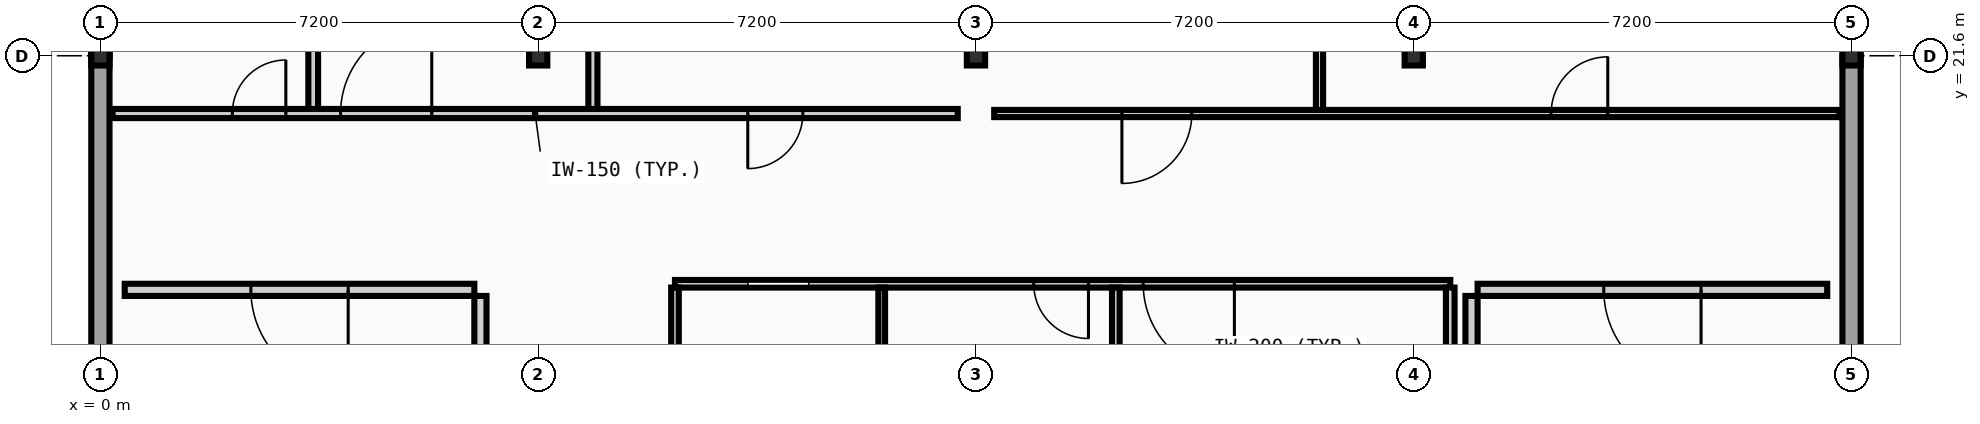
"""IFC4 building model, lengths in metres.
Left out: names, types, materials, properties, quantities, classifications, styles, units other than length and angle.
Written with IfcOpenShell. Run it as: python <this file> out.ifc"""

import sys

from ifc_helpers import new_model, si_unit, direction, frame, frame_2d, origin, origin_2d, place, context, subcontext, project, spatial, rectangle, i_section, extrude, element, fill, save


model = new_model("IFC4")
c1 = context("Model", 3, precision=1e-05, world=origin(), true_north=direction((0.0, 1.0)))
c2 = subcontext(c1, "Body", "Model", "MODEL_VIEW")
j1 = project(units=[si_unit("LENGTHUNIT", "METRE"), si_unit("PLANEANGLEUNIT", "RADIAN")], contexts=[c1])
p1 = place(None, origin())
s1 = spatial("IfcSite", under=j1, at=p1, CompositionType="ELEMENT")
p2 = place(p1, origin())
s2 = spatial("IfcBuilding", under=s1, at=p2, CompositionType="ELEMENT")
p3 = place(p2, frame((0.0, 0.0, 22.8)))
s3 = spatial("IfcBuildingStorey", under=s2, at=p3, CompositionType="ELEMENT", Elevation=22.8)
for number, where, z_axis, x_axis in (
    (1, (0.0, 21.6, 0.0), (0.0, 0.0, 1.0), (1.0, 0.0, 0.0)),
    (2, (7.2, 21.6, 0.0), (0.0, 0.0, 1.0), (1.0, 0.0, 0.0)),
    (3, (14.4, 21.6, 0.0), (0.0, 0.0, 1.0), (1.0, 0.0, 0.0)),
    (4, (21.6, 21.6, 0.0), (0.0, 0.0, 1.0), (1.0, 0.0, 0.0)),
    (5, (28.8, 21.6, 0.0), (0.0, 0.0, 1.0), (1.0, 0.0, 0.0)),
):
    element("IfcColumn", number, at=place(p3, frame(where, z_axis=z_axis, x_axis=x_axis)), inside=s3, PredefinedType="COLUMN", context=c2, shape_type="SweptSolid", body=[
        extrude(i_section(OverallWidth=0.3, OverallDepth=0.32, WebThickness=0.011, FlangeThickness=0.021, FilletRadius=0.027, at=origin_2d()), origin(), (0.0, 0.0, 1.0), 4.4),
    ])
p4 = place(p3, frame((0.0, 21.6, 0.0), z_axis=(0.0, 0.0, 1.0), x_axis=(0.0, -1.0, 0.0)))
e6 = element("IfcWall", 6, at=p4, inside=s3, PredefinedType="STANDARD", context=c2, shape_type="SweptSolid", body=[
    extrude(rectangle(XDim=7.15, YDim=0.3, at=frame_2d((3.575, 0.0))), origin(), (0.0, 0.0, 1.0), 4.215),
])
p5 = place(p3, frame((0.0, 28.8, 0.0), z_axis=(0.0, 0.0, 1.0), x_axis=(0.0, -1.0, 0.0)))
e7 = element("IfcWall", 7, at=p5, inside=s3, PredefinedType="STANDARD", context=c2, shape_type="SweptSolid", body=[
    extrude(rectangle(XDim=7.2, YDim=0.3, at=frame_2d((3.6, 0.0))), origin(), (0.0, 0.0, 1.0), 3.9),
])
p6 = place(p5, frame((1.56, 0.0, 0.9)))
e8 = element("IfcOpeningElement", 8, at=p6, cuts=e7, PredefinedType="OPENING", context=c2, shape_type="SweptSolid", body=[
    extrude(rectangle(XDim=1.2, YDim=1.8, at=frame_2d((0.6, 0.9))), frame((0.0, 0.16, 0.0), z_axis=(0.0, -1.0, 0.0), x_axis=(1.0, 0.0, 0.0)), (0.0, 0.0, 1.0), 0.32),
])
p7 = place(p5, frame((4.44, 0.0, 0.9)))
e9 = element("IfcOpeningElement", 9, at=p7, cuts=e7, PredefinedType="OPENING", context=c2, shape_type="SweptSolid", body=[
    extrude(rectangle(XDim=1.2, YDim=1.8, at=frame_2d((0.6, 0.9))), frame((0.0, 0.16, 0.0), z_axis=(0.0, -1.0, 0.0), x_axis=(1.0, 0.0, 0.0)), (0.0, 0.0, 1.0), 0.32),
])
p8 = place(p3, frame((28.8, 14.45, 0.0), z_axis=(0.0, 0.0, 1.0), x_axis=(0.0, 1.0, 0.0)))
e10 = element("IfcWall", 10, at=p8, inside=s3, PredefinedType="STANDARD", context=c2, shape_type="SweptSolid", body=[
    extrude(rectangle(XDim=7.15, YDim=0.3, at=frame_2d((3.575, 0.0))), origin(), (0.0, 0.0, 1.0), 4.215),
])
p9 = place(p3, frame((0.4, 17.75, 0.0), z_axis=(0.0, 0.0, 1.0), x_axis=(1.0, 0.0, 0.0)))
e11 = element("IfcWall", 11, at=p9, inside=s3, PredefinedType="PARTITIONING", context=c2, shape_type="SweptSolid", body=[
    extrude(rectangle(XDim=5.75, YDim=0.2, at=frame_2d((2.875, 0.0))), origin(), (0.0, 0.0, 1.0), 4.215),
])
p10 = place(p9, frame((2.075, 0.0, 0.0)))
e12 = element("IfcOpeningElement", 12, at=p10, cuts=e11, PredefinedType="OPENING", context=c2, shape_type="SweptSolid", body=[
    extrude(rectangle(XDim=1.6, YDim=2.2, at=frame_2d((0.8, 1.1))), frame((0.0, 0.11, 0.0), z_axis=(0.0, -1.0, 0.0), x_axis=(1.0, 0.0, 0.0)), (0.0, 0.0, 1.0), 0.22),
])
p11 = place(p3, frame((6.25, 14.45, 0.0), z_axis=(0.0, 0.0, 1.0), x_axis=(0.0, 1.0, 0.0)))
e13 = element("IfcWall", 13, at=p11, inside=s3, PredefinedType="PARTITIONING", context=c2, shape_type="SweptSolid", body=[
    extrude(rectangle(XDim=3.2, YDim=0.2, at=frame_2d((1.6, 0.0))), origin(), (0.0, 0.0, 1.0), 4.215),
])
p12 = place(p3, frame((22.65, 17.75, 0.0), z_axis=(0.0, 0.0, 1.0), x_axis=(1.0, 0.0, 0.0)))
e14 = element("IfcWall", 14, at=p12, inside=s3, PredefinedType="PARTITIONING", context=c2, shape_type="SweptSolid", body=[
    extrude(rectangle(XDim=5.75, YDim=0.2, at=frame_2d((2.875, 0.0))), origin(), (0.0, 0.0, 1.0), 4.215),
])
p13 = place(p12, frame((2.075, 0.0, 0.0)))
e15 = element("IfcOpeningElement", 15, at=p13, cuts=e14, PredefinedType="OPENING", context=c2, shape_type="SweptSolid", body=[
    extrude(rectangle(XDim=1.6, YDim=2.2, at=frame_2d((0.8, 1.1))), frame((0.0, 0.11, 0.0), z_axis=(0.0, -1.0, 0.0), x_axis=(1.0, 0.0, 0.0)), (0.0, 0.0, 1.0), 0.22),
])
p14 = place(p3, frame((22.55, 14.45, 0.0), z_axis=(0.0, 0.0, 1.0), x_axis=(0.0, 1.0, 0.0)))
e16 = element("IfcWall", 16, at=p14, inside=s3, PredefinedType="PARTITIONING", context=c2, shape_type="SweptSolid", body=[
    extrude(rectangle(XDim=3.2, YDim=0.2, at=frame_2d((1.6, 0.0))), origin(), (0.0, 0.0, 1.0), 4.215),
])
p15 = place(p3, frame((9.45, 17.85, 0.0), z_axis=(0.0, 0.0, 1.0), x_axis=(1.0, 0.0, 0.0)))
e17 = element("IfcWall", 17, at=p15, inside=s3, PredefinedType="PARTITIONING", context=c2, shape_type="SweptSolid", body=[
    extrude(rectangle(XDim=12.75, YDim=0.125, at=frame_2d((6.375, 0.0))), origin(), (0.0, 0.0, 1.0), 4.215),
])
p16 = place(p15, frame((1.2, 0.0, 0.0)))
e18 = element("IfcOpeningElement", 18, at=p16, cuts=e17, PredefinedType="OPENING", context=c2, shape_type="SweptSolid", body=[
    extrude(rectangle(XDim=1.0, YDim=2.1, at=frame_2d((0.5, 1.05))), frame((0.0, 0.073, 0.0), z_axis=(0.0, -1.0, 0.0), x_axis=(1.0, 0.0, 0.0)), (0.0, 0.0, 1.0), 0.145),
])
p17 = place(p15, frame((5.9, 0.0, 0.0)))
e19 = element("IfcOpeningElement", 19, at=p17, cuts=e17, PredefinedType="OPENING", context=c2, shape_type="SweptSolid", body=[
    extrude(rectangle(XDim=0.9, YDim=2.1, at=frame_2d((0.45, 1.05))), frame((0.0, 0.073, 0.0), z_axis=(0.0, -1.0, 0.0), x_axis=(1.0, 0.0, 0.0)), (0.0, 0.0, 1.0), 0.145),
])
p18 = place(p15, frame((7.7, 0.0, 0.0)))
e20 = element("IfcOpeningElement", 20, at=p18, cuts=e17, PredefinedType="OPENING", context=c2, shape_type="SweptSolid", body=[
    extrude(rectangle(XDim=1.5, YDim=2.2, at=frame_2d((0.75, 1.1))), frame((0.0, 0.073, 0.0), z_axis=(0.0, -1.0, 0.0), x_axis=(1.0, 0.0, 0.0)), (0.0, 0.0, 1.0), 0.145),
])
p19 = place(p3, frame((0.2, 20.65, 0.0), z_axis=(0.0, 0.0, 1.0), x_axis=(1.0, 0.0, 0.0)))
e21 = element("IfcWall", 21, at=p19, inside=s3, PredefinedType="PARTITIONING", context=c2, shape_type="SweptSolid", body=[
    extrude(rectangle(XDim=13.9, YDim=0.15, at=frame_2d((6.95, 0.0))), origin(), (0.0, 0.0, 1.0), 4.215),
])
p20 = place(p19, frame((1.97, 0.0, 0.0)))
e22 = element("IfcOpeningElement", 22, at=p20, cuts=e21, PredefinedType="OPENING", context=c2, shape_type="SweptSolid", body=[
    extrude(rectangle(XDim=0.88, YDim=2.096, at=frame_2d((0.44, 1.048))), frame((0.0, 0.085, 0.0), z_axis=(0.0, -1.0, 0.0), x_axis=(1.0, 0.0, 0.0)), (0.0, 0.0, 1.0), 0.17),
])
p21 = place(p19, frame((3.75, 0.0, 0.0)))
e23 = element("IfcOpeningElement", 23, at=p21, cuts=e21, PredefinedType="OPENING", context=c2, shape_type="SweptSolid", body=[
    extrude(rectangle(XDim=1.5, YDim=2.2, at=frame_2d((0.75, 1.1))), frame((0.0, 0.085, 0.0), z_axis=(0.0, -1.0, 0.0), x_axis=(1.0, 0.0, 0.0)), (0.0, 0.0, 1.0), 0.17),
])
p22 = place(p19, frame((10.447, 0.0, 0.0)))
e24 = element("IfcOpeningElement", 24, at=p22, cuts=e21, PredefinedType="OPENING", context=c2, shape_type="SweptSolid", body=[
    extrude(rectangle(XDim=0.906, YDim=2.096, at=frame_2d((0.453, 1.048))), frame((0.0, 0.085, 0.0), z_axis=(0.0, -1.0, 0.0), x_axis=(1.0, 0.0, 0.0)), (0.0, 0.0, 1.0), 0.17),
])
p23 = place(p3, frame((14.7, 20.65, 0.0), z_axis=(0.0, 0.0, 1.0), x_axis=(1.0, 0.0, 0.0)))
e25 = element("IfcWall", 25, at=p23, inside=s3, PredefinedType="PARTITIONING", context=c2, shape_type="SweptSolid", body=[
    extrude(rectangle(XDim=13.9, YDim=0.118, at=frame_2d((6.95, 0.0))), origin(), (0.0, 0.0, 1.0), 4.215),
])
p24 = place(p23, frame((2.1, 0.0, 0.0)))
e26 = element("IfcOpeningElement", 26, at=p24, cuts=e25, PredefinedType="OPENING", context=c2, shape_type="SweptSolid", body=[
    extrude(rectangle(XDim=1.15, YDim=2.15, at=frame_2d((0.575, 1.075))), frame((0.0, 0.069, 0.0), z_axis=(0.0, -1.0, 0.0), x_axis=(1.0, 0.0, 0.0)), (0.0, 0.0, 1.0), 0.138),
])
p25 = place(p23, frame((9.159, 0.0, 0.0)))
e27 = element("IfcOpeningElement", 27, at=p25, cuts=e25, PredefinedType="OPENING", context=c2, shape_type="SweptSolid", body=[
    extrude(rectangle(XDim=0.932, YDim=2.096, at=frame_2d((0.466, 1.048))), frame((0.0, 0.069, 0.0), z_axis=(0.0, -1.0, 0.0), x_axis=(1.0, 0.0, 0.0)), (0.0, 0.0, 1.0), 0.138),
])
p26 = place(p3, frame((3.5, 20.725, 0.0), z_axis=(0.0, 0.0, 1.0), x_axis=(0.0, 1.0, 0.0)))
e28 = element("IfcWall", 28, at=p26, inside=s3, PredefinedType="PARTITIONING", context=c2, shape_type="SweptSolid", body=[
    extrude(rectangle(XDim=22.275, YDim=0.16, at=frame_2d((11.137, 0.0))), origin(), (0.0, 0.0, 1.0), 4.215),
])
p27 = place(p3, frame((8.1, 20.725, 0.0), z_axis=(0.0, 0.0, 1.0), x_axis=(0.0, 1.0, 0.0)))
e29 = element("IfcWall", 29, at=p27, inside=s3, PredefinedType="PARTITIONING", context=c2, shape_type="SweptSolid", body=[
    extrude(rectangle(XDim=22.195, YDim=0.15, at=frame_2d((11.097, 0.0))), origin(), (0.0, 0.0, 1.0), 4.215),
])
p28 = place(p3, frame((9.45, 3.36, 0.0), z_axis=(0.0, 0.0, 1.0), x_axis=(0.0, 1.0, 0.0)))
e30 = element("IfcWall", 30, at=p28, inside=s3, PredefinedType="PARTITIONING", context=c2, shape_type="SweptSolid", body=[
    extrude(rectangle(XDim=14.427, YDim=0.125, at=frame_2d((7.214, 0.0))), origin(), (0.0, 0.0, 1.0), 4.0),
])
p29 = place(p3, frame((12.85, 0.2, 0.0), z_axis=(0.0, 0.0, 1.0), x_axis=(0.0, 1.0, 0.0)))
e31 = element("IfcWall", 31, at=p29, inside=s3, PredefinedType="PARTITIONING", context=c2, shape_type="SweptSolid", body=[
    extrude(rectangle(XDim=17.588, YDim=0.11, at=frame_2d((8.794, 0.0))), origin(), (0.0, 0.0, 1.0), 4.215),
])
p30 = place(p3, frame((16.7, 0.2, 0.0), z_axis=(0.0, 0.0, 1.0), x_axis=(0.0, 1.0, 0.0)))
e32 = element("IfcWall", 32, at=p30, inside=s3, PredefinedType="PARTITIONING", context=c2, shape_type="SweptSolid", body=[
    extrude(rectangle(XDim=17.588, YDim=0.125, at=frame_2d((8.794, 0.0))), origin(), (0.0, 0.0, 1.0), 4.0),
])
p31 = place(p3, frame((20.05, 20.709, 0.0), z_axis=(0.0, 0.0, 1.0), x_axis=(0.0, 1.0, 0.0)))
e33 = element("IfcWall", 33, at=p31, inside=s3, PredefinedType="PARTITIONING", context=c2, shape_type="SweptSolid", body=[
    extrude(rectangle(XDim=22.232, YDim=0.118, at=frame_2d((11.116, 0.0))), origin(), (0.0, 0.0, 1.0), 4.215),
])
p32 = place(p3, frame((22.2, 14.65, 0.0), z_axis=(0.0, 0.0, 1.0), x_axis=(0.0, 1.0, 0.0)))
e34 = element("IfcWall", 34, at=p32, inside=s3, PredefinedType="PARTITIONING", context=c2, shape_type="SweptSolid", body=[
    extrude(rectangle(XDim=3.138, YDim=0.142, at=frame_2d((1.569, 0.0))), origin(), (0.0, 0.0, 1.0), 4.215),
])
p33 = place(p10, origin())
e35 = element("IfcDoor", 35, at=p33, inside=s3, OperationType="DOUBLE_DOOR_SINGLE_SWING", PredefinedType="DOOR", context=c2, shape_type="SweptSolid", body=[
    extrude(rectangle(XDim=1.6, YDim=2.2, at=frame_2d((0.8, 1.1))), frame((0.0, 0.025, 0.0), z_axis=(0.0, -1.0, 0.0), x_axis=(1.0, 0.0, 0.0)), (0.0, 0.0, 1.0), 0.05),
])
fill(e12, e35)
p34 = place(p13, origin())
e36 = element("IfcDoor", 36, at=p34, inside=s3, OperationType="DOUBLE_DOOR_SINGLE_SWING", PredefinedType="DOOR", context=c2, shape_type="SweptSolid", body=[
    extrude(rectangle(XDim=1.6, YDim=2.2, at=frame_2d((0.8, 1.1))), frame((0.0, 0.025, 0.0), z_axis=(0.0, -1.0, 0.0), x_axis=(1.0, 0.0, 0.0)), (0.0, 0.0, 1.0), 0.05),
])
fill(e15, e36)
p35 = place(p16, origin())
e37 = element("IfcDoor", 37, at=p35, inside=s3, OperationType="SLIDING_TO_LEFT", PredefinedType="DOOR", context=c2, shape_type="SweptSolid", body=[
    extrude(rectangle(XDim=1.0, YDim=2.1, at=frame_2d((0.5, 1.05))), frame((0.0, 0.025, 0.0), z_axis=(0.0, -1.0, 0.0), x_axis=(1.0, 0.0, 0.0)), (0.0, 0.0, 1.0), 0.05),
])
fill(e18, e37)
p36 = place(p17, origin())
e38 = element("IfcDoor", 38, at=p36, inside=s3, OperationType="SINGLE_SWING_RIGHT", PredefinedType="DOOR", context=c2, shape_type="SweptSolid", body=[
    extrude(rectangle(XDim=0.9, YDim=2.1, at=frame_2d((0.45, 1.05))), frame((0.0, 0.025, 0.0), z_axis=(0.0, -1.0, 0.0), x_axis=(1.0, 0.0, 0.0)), (0.0, 0.0, 1.0), 0.05),
])
fill(e19, e38)
p37 = place(p20, frame((0.88, 0.0, 0.0), z_axis=(0.0, 0.0, 1.0), x_axis=(-1.0, 0.0, 0.0)))
e39 = element("IfcDoor", 39, at=p37, inside=s3, OperationType="SINGLE_SWING_RIGHT", PredefinedType="DOOR", context=c2, shape_type="SweptSolid", body=[
    extrude(rectangle(XDim=0.88, YDim=2.096, at=frame_2d((0.44, 1.048))), frame((0.0, 0.025, 0.0), z_axis=(0.0, -1.0, 0.0), x_axis=(1.0, 0.0, 0.0)), (0.0, 0.0, 1.0), 0.05),
])
fill(e22, e39)
p38 = place(p18, origin())
e40 = element("IfcDoor", 40, at=p38, inside=s3, OperationType="DOUBLE_DOOR_SINGLE_SWING", PredefinedType="DOOR", context=c2, shape_type="SweptSolid", body=[
    extrude(rectangle(XDim=1.5, YDim=2.2, at=frame_2d((0.75, 1.1))), frame((0.0, 0.025, 0.0), z_axis=(0.0, -1.0, 0.0), x_axis=(1.0, 0.0, 0.0)), (0.0, 0.0, 1.0), 0.05),
])
fill(e20, e40)
p39 = place(p21, frame((1.5, 0.0, 0.0), z_axis=(0.0, 0.0, 1.0), x_axis=(-1.0, 0.0, 0.0)))
e41 = element("IfcDoor", 41, at=p39, inside=s3, OperationType="DOUBLE_DOOR_SINGLE_SWING", PredefinedType="DOOR", context=c2, shape_type="SweptSolid", body=[
    extrude(rectangle(XDim=1.5, YDim=2.2, at=frame_2d((0.75, 1.1))), frame((0.0, 0.025, 0.0), z_axis=(0.0, -1.0, 0.0), x_axis=(1.0, 0.0, 0.0)), (0.0, 0.0, 1.0), 0.05),
])
fill(e23, e41)
p40 = place(p24, frame((1.15, 0.0, 0.0), z_axis=(0.0, 0.0, 1.0), x_axis=(-1.0, 0.0, 0.0)))
e42 = element("IfcDoor", 42, at=p40, inside=s3, OperationType="SINGLE_SWING_LEFT", PredefinedType="DOOR", context=c2, shape_type="SweptSolid", body=[
    extrude(rectangle(XDim=1.15, YDim=2.15, at=frame_2d((0.575, 1.075))), frame((0.0, 0.025, 0.0), z_axis=(0.0, -1.0, 0.0), x_axis=(1.0, 0.0, 0.0)), (0.0, 0.0, 1.0), 0.05),
])
fill(e26, e42)
p41 = place(p22, frame((0.906, 0.0, 0.0), z_axis=(0.0, 0.0, 1.0), x_axis=(-1.0, 0.0, 0.0)))
e43 = element("IfcDoor", 43, at=p41, inside=s3, OperationType="SINGLE_SWING_LEFT", PredefinedType="DOOR", context=c2, shape_type="SweptSolid", body=[
    extrude(rectangle(XDim=0.906, YDim=2.096, at=frame_2d((0.453, 1.048))), frame((0.0, 0.025, 0.0), z_axis=(0.0, -1.0, 0.0), x_axis=(1.0, 0.0, 0.0)), (0.0, 0.0, 1.0), 0.05),
])
fill(e24, e43)
p42 = place(p25, frame((0.932, 0.0, 0.0), z_axis=(0.0, 0.0, 1.0), x_axis=(-1.0, 0.0, 0.0)))
e44 = element("IfcDoor", 44, at=p42, inside=s3, OperationType="SINGLE_SWING_RIGHT", PredefinedType="DOOR", context=c2, shape_type="SweptSolid", body=[
    extrude(rectangle(XDim=0.932, YDim=2.096, at=frame_2d((0.466, 1.048))), frame((0.0, 0.025, 0.0), z_axis=(0.0, -1.0, 0.0), x_axis=(1.0, 0.0, 0.0)), (0.0, 0.0, 1.0), 0.05),
])
fill(e27, e44)
save(model, sys.argv[1])
